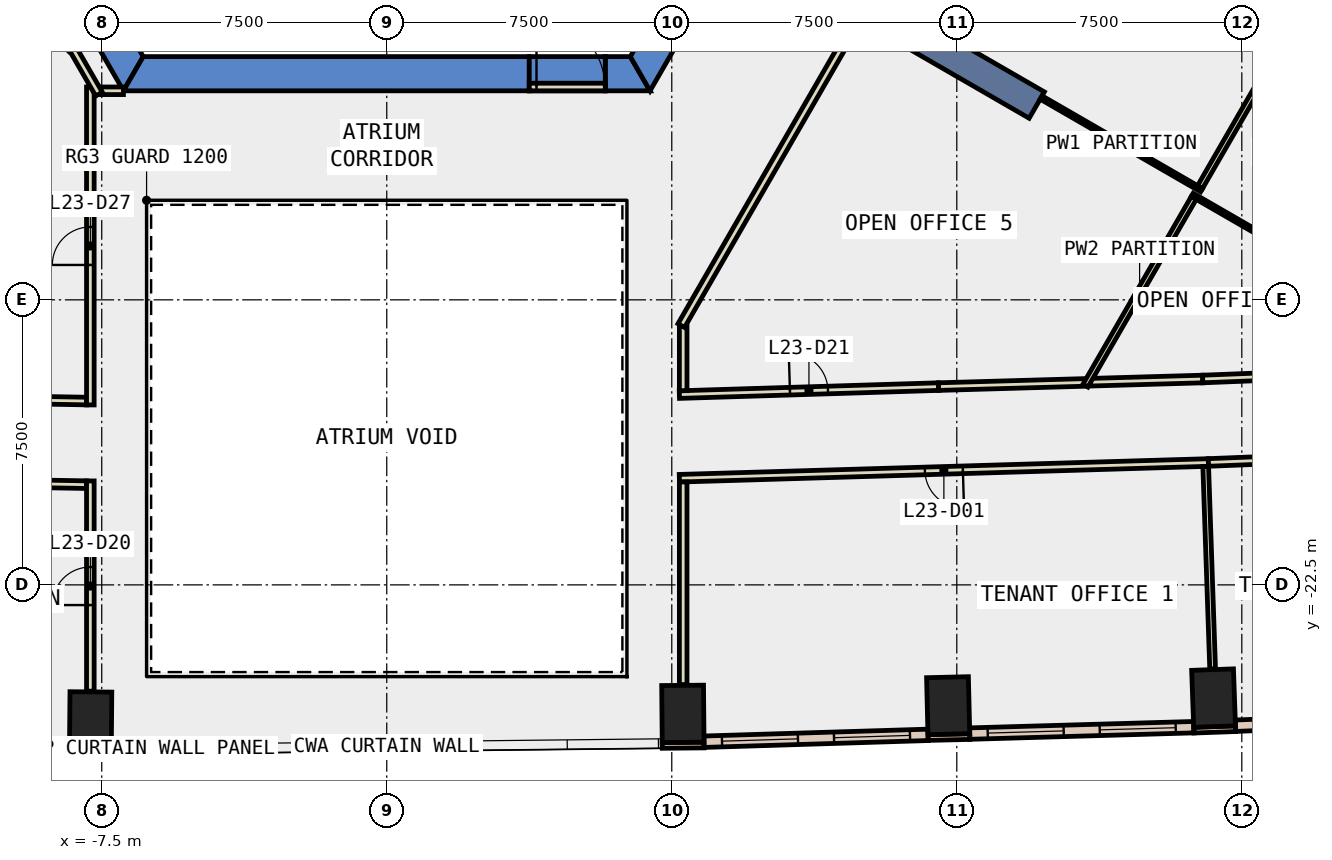
"""IFC4 building model, lengths in metres.
Left out: names, types, materials, properties, quantities, classifications, styles, units other than length and angle.
Written with IfcOpenShell. Run it as: python <this file> out.ifc"""

import sys

from ifc_helpers import new_model, si_unit, direction, frame, frame_2d, origin, origin_2d, place, context, subcontext, project, spatial, polyline, rectangle, outline, extrude, element, fill, save


model = new_model("IFC4")
c1 = context("Model", 3, precision=1e-05, world=origin(), true_north=direction((0.0, 1.0)))
c2 = subcontext(c1, "Body", "Model", "MODEL_VIEW")
j1 = project(units=[si_unit("LENGTHUNIT", "METRE"), si_unit("PLANEANGLEUNIT", "RADIAN")], contexts=[c1])
p1 = place(None, origin())
s1 = spatial("IfcSite", under=j1, at=p1, CompositionType="ELEMENT")
p2 = place(p1, origin())
s2 = spatial("IfcBuilding", under=s1, at=p2, CompositionType="ELEMENT")
p3 = place(p2, frame((0.0, 0.0, 107.6)))
s3 = spatial("IfcBuildingStorey", under=s2, at=p3, CompositionType="ELEMENT", Elevation=107.6)
for number, where, z_axis, x_axis in (
    (1, (-7.792, -26.066, -0.4), (0.0, 0.0, 1.0), (-1.0, 0.009, 0.0)),
    (2, (7.792, -25.894, -0.4), (0.0, 0.0, 1.0), (1.0, 0.009, 0.0)),
    (3, (14.773, -25.679, -0.4), (0.0, 0.0, 1.0), (1.0, 0.024, 0.0)),
    (4, (21.757, -25.479, -0.4), (0.0, 0.0, 1.0), (0.999, 0.035, 0.0)),
):
    element("IfcColumn", number, at=place(p3, frame(where, z_axis=z_axis, x_axis=x_axis)), inside=s3, PredefinedType="COLUMN", context=c2, shape_type="SweptSolid", body=[
        extrude(rectangle(XDim=1.1, YDim=1.5, at=origin_2d()), origin(), (0.0, 0.0, 1.0), 4.2),
    ])
p4 = place(p3, frame((0.0, 0.0, -0.4)))
e5 = element("IfcWall", 5, at=p4, inside=s3, PredefinedType="SHEAR", context=c2, shape_type="SweptSolid", body=[
    extrude(outline(polyline([(-13.856, 2.5), (-6.928, -9.5), (-6.409, -8.6), (-12.817, 2.5), (-13.856, 2.5)])), origin(), (0.0, 0.0, 1.0), 4.2),
])
p5 = place(p3, frame((0.0, 0.0, -0.4)))
e6 = element("IfcWall", 6, at=p5, inside=s3, PredefinedType="SHEAR", context=c2, shape_type="SweptSolid", body=[
    extrude(outline(polyline([(3.75, -9.5), (3.75, -8.6), (-6.409, -8.6), (-6.928, -9.5), (3.75, -9.5)])), origin(), (0.0, 0.0, 1.0), 4.2),
])
p6 = place(p3, frame((0.0, 0.0, -0.4)))
e7 = element("IfcWall", 7, at=p6, inside=s3, PredefinedType="SHEAR", context=c2, shape_type="SweptSolid", body=[
    extrude(outline(polyline([(5.75, -8.6), (5.75, -9.5), (6.928, -9.5), (6.409, -8.6), (5.75, -8.6)])), origin(), (0.0, 0.0, 1.0), 4.2),
])
p7 = place(p3, frame((0.0, 0.0, 3.6)))
e8 = element("IfcWall", 8, at=p7, inside=s3, PredefinedType="SHEAR", context=c2, shape_type="SweptSolid", body=[
    extrude(outline(polyline([(5.75, -9.5), (5.75, -8.6), (3.75, -8.6), (3.75, -9.5), (5.75, -9.5)])), origin(), (0.0, 0.0, 1.0), 0.2),
])
p8 = place(p3, frame((0.0, 0.0, -0.4)))
e9 = element("IfcWall", 9, at=p8, inside=s3, PredefinedType="SHEAR", context=c2, shape_type="SweptSolid", body=[
    extrude(outline(polyline([(8.117, -7.44), (7.338, -6.99), (6.409, -8.6), (6.928, -9.5), (8.117, -7.44)])), origin(), (0.0, 0.0, 1.0), 4.2),
])
p9 = place(p3, frame((9.31, -5.375, -0.4), z_axis=(0.0, 0.0, 1.0), x_axis=(0.866017533419, -0.500013631625, 0.0)))
e10 = element("IfcWall", 10, at=p9, inside=s3, PredefinedType="SHEAR", context=c2, shape_type="SweptSolid", body=[
    extrude(rectangle(XDim=9.0, YDim=0.8, at=frame_2d((4.5, 0.0))), origin(), (0.0, 0.0, 1.0), 4.2),
])
for number, where, z_axis, x_axis in (
    (11, (-8.349, -26.886, 0.0), (0.0, 0.0, 1.0), (1.0, -0.009, 0.0)),
    (12, (7.249, -26.724, 0.0), (0.0, 0.0, 1.0), (1.0, 0.009, 0.0)),
):
    element("IfcWall", number, at=place(p3, frame(where, z_axis=z_axis, x_axis=x_axis)), inside=s3, PredefinedType="STANDARD", context=c2, shape_type="SweptSolid", body=[
        extrude(rectangle(XDim=1.1, YDim=0.15, at=frame_2d((0.55, 0.0))), origin(), (0.0, 0.0, 1.0), 3.8),
    ])
p10 = place(p3, frame((14.243, -26.517, 0.0), z_axis=(0.0, 0.0, 1.0), x_axis=(0.999718180159, 0.023739424163, 0.0)))
e13 = element("IfcWall", 13, at=p10, inside=s3, PredefinedType="STANDARD", context=c2, shape_type="SweptSolid", body=[
    extrude(rectangle(XDim=1.1, YDim=0.15, at=frame_2d((0.55, 0.0))), origin(), (0.0, 0.0, 1.0), 3.8),
])
p11 = place(p3, frame((21.237, -26.323, 0.0), z_axis=(0.0, 0.0, 1.0), x_axis=(0.999368780235, 0.035525217693, 0.0)))
e14 = element("IfcWall", 14, at=p11, inside=s3, PredefinedType="STANDARD", context=c2, shape_type="SweptSolid", body=[
    extrude(rectangle(XDim=1.1, YDim=0.15, at=frame_2d((0.55, 0.0))), origin(), (0.0, 0.0, 1.0), 3.8),
])
p12 = place(p3, frame((-14.242, -26.703, 0.0), z_axis=(0.0, 0.0, 1.0), x_axis=(0.999847261365, -0.017477240672, 0.0)))
e15 = element("IfcWall", 15, at=p12, inside=s3, PredefinedType="STANDARD", context=c2, shape_type="SweptSolid", body=[
    extrude(rectangle(XDim=5.895, YDim=0.3, at=frame_2d((2.948, 0.0))), origin(), (0.0, 0.0, 1.0), 3.8),
])
p13 = place(p12, frame((0.474, 0.0, 0.9)))
e16 = element("IfcOpeningElement", 16, at=p13, cuts=e15, PredefinedType="OPENING", context=c2, shape_type="SweptSolid", body=[
    extrude(rectangle(XDim=2.0, YDim=2.6, at=frame_2d((1.0, 1.3))), frame((0.0, 0.16, 0.0), z_axis=(0.0, -1.0, 0.0), x_axis=(1.0, 0.0, 0.0)), (0.0, 0.0, 1.0), 0.32),
])
p14 = place(p12, frame((3.421, 0.0, 0.9)))
e17 = element("IfcOpeningElement", 17, at=p14, cuts=e15, PredefinedType="OPENING", context=c2, shape_type="SweptSolid", body=[
    extrude(rectangle(XDim=2.0, YDim=2.6, at=frame_2d((1.0, 1.3))), frame((0.0, 0.16, 0.0), z_axis=(0.0, -1.0, 0.0), x_axis=(1.0, 0.0, 0.0)), (0.0, 0.0, 1.0), 0.32),
])
p15 = place(p3, frame((8.347, -26.627, 0.0), z_axis=(0.0, 0.0, 1.0), x_axis=(0.999529601824, 0.030668796478, 0.0)))
e18 = element("IfcWall", 18, at=p15, inside=s3, PredefinedType="STANDARD", context=c2, shape_type="SweptSolid", body=[
    extrude(rectangle(XDim=5.899, YDim=0.3, at=frame_2d((2.949, 0.0))), origin(), (0.0, 0.0, 1.0), 3.8),
])
p16 = place(p15, frame((0.475, 0.0, 0.9)))
e19 = element("IfcOpeningElement", 19, at=p16, cuts=e18, PredefinedType="OPENING", context=c2, shape_type="SweptSolid", body=[
    extrude(rectangle(XDim=2.0, YDim=2.6, at=frame_2d((1.0, 1.3))), frame((0.0, 0.16, 0.0), z_axis=(0.0, -1.0, 0.0), x_axis=(1.0, 0.0, 0.0)), (0.0, 0.0, 1.0), 0.32),
])
p17 = place(p15, frame((3.424, 0.0, 0.9)))
e20 = element("IfcOpeningElement", 20, at=p17, cuts=e18, PredefinedType="OPENING", context=c2, shape_type="SweptSolid", body=[
    extrude(rectangle(XDim=2.0, YDim=2.6, at=frame_2d((1.0, 1.3))), frame((0.0, 0.16, 0.0), z_axis=(0.0, -1.0, 0.0), x_axis=(1.0, 0.0, 0.0)), (0.0, 0.0, 1.0), 0.32),
])
p18 = place(p3, frame((15.34, -26.413, 0.0), z_axis=(0.0, 0.0, 1.0), x_axis=(0.999588397616, 0.028688592709, 0.0)))
e21 = element("IfcWall", 21, at=p18, inside=s3, PredefinedType="STANDARD", context=c2, shape_type="SweptSolid", body=[
    extrude(rectangle(XDim=5.897, YDim=0.3, at=frame_2d((2.949, 0.0))), origin(), (0.0, 0.0, 1.0), 3.8),
])
p19 = place(p18, frame((0.474, 0.0, 0.9)))
e22 = element("IfcOpeningElement", 22, at=p19, cuts=e21, PredefinedType="OPENING", context=c2, shape_type="SweptSolid", body=[
    extrude(rectangle(XDim=2.0, YDim=2.6, at=frame_2d((1.0, 1.3))), frame((0.0, 0.16, 0.0), z_axis=(0.0, -1.0, 0.0), x_axis=(1.0, 0.0, 0.0)), (0.0, 0.0, 1.0), 0.32),
])
p20 = place(p18, frame((3.423, 0.0, 0.9)))
e23 = element("IfcOpeningElement", 23, at=p20, cuts=e21, PredefinedType="OPENING", context=c2, shape_type="SweptSolid", body=[
    extrude(rectangle(XDim=2.0, YDim=2.6, at=frame_2d((1.0, 1.3))), frame((0.0, 0.16, 0.0), z_axis=(0.0, -1.0, 0.0), x_axis=(1.0, 0.0, 0.0)), (0.0, 0.0, 1.0), 0.32),
])
p21 = place(p3, frame((22.332, -26.206, 0.0), z_axis=(0.0, 0.0, 1.0), x_axis=(0.99922113396, 0.039460428885, 0.0)))
e24 = element("IfcWall", 24, at=p21, inside=s3, PredefinedType="STANDARD", context=c2, shape_type="SweptSolid", body=[
    extrude(rectangle(XDim=5.878, YDim=0.3, at=frame_2d((2.939, 0.0))), origin(), (0.0, 0.0, 1.0), 3.8),
])
p22 = place(p21, frame((0.469, 0.0, 0.9)))
e25 = element("IfcOpeningElement", 25, at=p22, cuts=e24, PredefinedType="OPENING", context=c2, shape_type="SweptSolid", body=[
    extrude(rectangle(XDim=2.0, YDim=2.6, at=frame_2d((1.0, 1.3))), frame((0.0, 0.16, 0.0), z_axis=(0.0, -1.0, 0.0), x_axis=(1.0, 0.0, 0.0)), (0.0, 0.0, 1.0), 0.32),
])
p23 = place(p21, frame((3.408, 0.0, 0.9)))
e26 = element("IfcOpeningElement", 26, at=p23, cuts=e24, PredefinedType="OPENING", context=c2, shape_type="SweptSolid", body=[
    extrude(rectangle(XDim=2.0, YDim=2.6, at=frame_2d((1.0, 1.3))), frame((0.0, 0.16, 0.0), z_axis=(0.0, -1.0, 0.0), x_axis=(1.0, 0.0, 0.0)), (0.0, 0.0, 1.0), 0.32),
])
p24 = place(p3, frame((7.7, -17.493, 0.0), z_axis=(0.0, 0.0, 1.0), x_axis=(0.999526319751, 0.030775576778, 0.0)))
e27 = element("IfcWall", 27, at=p24, inside=s3, PredefinedType="PARTITIONING", context=c2, shape_type="SweptSolid", body=[
    extrude(rectangle(XDim=6.822, YDim=0.2, at=frame_2d((3.411, 0.0))), origin(), (0.0, 0.0, 1.0), 3.8),
])
p25 = place(p24, frame((2.911, 0.0, 0.0)))
e28 = element("IfcOpeningElement", 28, at=p25, cuts=e27, PredefinedType="OPENING", context=c2, shape_type="SweptSolid", body=[
    extrude(rectangle(XDim=1.0, YDim=2.1, at=frame_2d((0.5, 1.05))), frame((0.0, 0.11, 0.0), z_axis=(0.0, -1.0, 0.0), x_axis=(1.0, 0.0, 0.0)), (0.0, 0.0, 1.0), 0.22),
])
p26 = place(p3, frame((14.519, -17.283, 0.0), z_axis=(0.0, 0.0, 1.0), x_axis=(0.999591204998, 0.028590608419, 0.0)))
e29 = element("IfcWall", 29, at=p26, inside=s3, PredefinedType="PARTITIONING", context=c2, shape_type="SweptSolid", body=[
    extrude(rectangle(XDim=3.843, YDim=0.2, at=frame_2d((1.921, 0.0))), origin(), (0.0, 0.0, 1.0), 3.8),
])
p27 = place(p3, frame((18.509, -17.168, 0.0), z_axis=(0.0, 0.0, 1.0), x_axis=(0.999588854267, 0.028672677323, 0.0)))
e30 = element("IfcWall", 30, at=p27, inside=s3, PredefinedType="PARTITIONING", context=c2, shape_type="SweptSolid", body=[
    extrude(rectangle(XDim=2.963, YDim=0.2, at=frame_2d((1.481, 0.0))), origin(), (0.0, 0.0, 1.0), 3.8),
])
p28 = place(p3, frame((21.471, -17.083, 0.0), z_axis=(0.0, 0.0, 1.0), x_axis=(0.999221407079, 0.039453512338, 0.0)))
e31 = element("IfcWall", 31, at=p28, inside=s3, PredefinedType="PARTITIONING", context=c2, shape_type="SweptSolid", body=[
    extrude(rectangle(XDim=6.083, YDim=0.2, at=frame_2d((3.042, 0.0))), origin(), (0.0, 0.0, 1.0), 3.8),
])
p29 = place(p28, frame((2.541, 0.0, 0.0)))
e32 = element("IfcOpeningElement", 32, at=p29, cuts=e31, PredefinedType="OPENING", context=c2, shape_type="SweptSolid", body=[
    extrude(rectangle(XDim=1.0, YDim=2.1, at=frame_2d((0.5, 1.05))), frame((0.0, 0.11, 0.0), z_axis=(0.0, -1.0, 0.0), x_axis=(1.0, 0.0, 0.0)), (0.0, 0.0, 1.0), 0.22),
])
p30 = place(p3, frame((-10.923, -17.61, 0.0), z_axis=(0.0, 0.0, 1.0), x_axis=(0.999846489632, -0.017521334753, 0.0)))
e33 = element("IfcWall", 33, at=p30, inside=s3, PredefinedType="PARTITIONING", context=c2, shape_type="SweptSolid", body=[
    extrude(rectangle(XDim=3.024, YDim=0.2, at=frame_2d((1.512, 0.0))), origin(), (0.0, 0.0, 1.0), 3.8),
])
p31 = place(p3, frame((21.621, -19.28, 0.0), z_axis=(0.0, 0.0, 1.0), x_axis=(-0.999557957525, -0.029730280001, 0.0)))
e34 = element("IfcWall", 34, at=p31, inside=s3, PredefinedType="PARTITIONING", context=c2, shape_type="SweptSolid", body=[
    extrude(rectangle(XDim=13.927, YDim=0.2, at=frame_2d((6.964, 0.0))), origin(), (0.0, 0.0, 1.0), 3.8),
])
p32 = place(p31, frame((6.464, 0.0, 0.0)))
e35 = element("IfcOpeningElement", 35, at=p32, cuts=e34, PredefinedType="OPENING", context=c2, shape_type="SweptSolid", body=[
    extrude(rectangle(XDim=1.0, YDim=2.1, at=frame_2d((0.5, 1.05))), frame((0.0, 0.11, 0.0), z_axis=(0.0, -1.0, 0.0), x_axis=(1.0, 0.0, 0.0)), (0.0, 0.0, 1.0), 0.22),
])
p33 = place(p3, frame((27.865, -19.032, 0.0), z_axis=(0.0, 0.0, 1.0), x_axis=(-0.999218029978, -0.039538950003, 0.0)))
e36 = element("IfcWall", 36, at=p33, inside=s3, PredefinedType="PARTITIONING", context=c2, shape_type="SweptSolid", body=[
    extrude(rectangle(XDim=6.249, YDim=0.2, at=frame_2d((3.125, 0.0))), origin(), (0.0, 0.0, 1.0), 3.8),
])
p34 = place(p33, frame((2.699, 0.0, 0.0)))
e37 = element("IfcOpeningElement", 37, at=p34, cuts=e36, PredefinedType="OPENING", context=c2, shape_type="SweptSolid", body=[
    extrude(rectangle(XDim=1.0, YDim=2.1, at=frame_2d((0.5, 1.05))), frame((0.0, 0.11, 0.0), z_axis=(0.0, -1.0, 0.0), x_axis=(1.0, 0.0, 0.0)), (0.0, 0.0, 1.0), 0.22),
])
p35 = place(p3, frame((-7.9, -19.863, 0.0), z_axis=(0.0, 0.0, 1.0), x_axis=(-0.999845883554, 0.017555886191, 0.0)))
e38 = element("IfcWall", 38, at=p35, inside=s3, PredefinedType="PARTITIONING", context=c2, shape_type="SweptSolid", body=[
    extrude(rectangle(XDim=3.198, YDim=0.2, at=frame_2d((1.599, 0.0))), origin(), (0.0, 0.0, 1.0), 3.8),
])
p36 = place(p3, frame((7.8, -15.69, 0.0), z_axis=(0.0, 0.0, 1.0), x_axis=(0.0, -1.0, 0.0)))
e39 = element("IfcWall", 39, at=p36, inside=s3, PredefinedType="PARTITIONING", context=c2, shape_type="SweptSolid", body=[
    extrude(rectangle(XDim=1.7, YDim=0.2, at=frame_2d((0.85, 0.0))), origin(), (0.0, 0.0, 1.0), 3.8),
])
p37 = place(p3, frame((-7.522, -9.499, 0.0), z_axis=(0.0, 0.0, 1.0), x_axis=(1.0, 0.0, 0.0)))
e40 = element("IfcWall", 40, at=p37, inside=s3, PredefinedType="PARTITIONING", context=c2, shape_type="SweptSolid", body=[
    extrude(rectangle(XDim=0.593, YDim=0.2, at=frame_2d((0.296, 0.0))), origin(), (0.0, 0.0, 1.0), 3.8),
])
p38 = place(p3, frame((-7.8, -17.765, 0.0), z_axis=(0.0, 0.0, 1.0), x_axis=(0.0, 1.0, 0.0)))
e41 = element("IfcWall", 41, at=p38, inside=s3, PredefinedType="PARTITIONING", context=c2, shape_type="SweptSolid", body=[
    extrude(rectangle(XDim=8.366, YDim=0.2, at=frame_2d((4.183, 0.0))), origin(), (0.0, 0.0, 1.0), 3.8),
])
p39 = place(p38, frame((3.683, 0.0, 0.0)))
e42 = element("IfcOpeningElement", 42, at=p39, cuts=e41, PredefinedType="OPENING", context=c2, shape_type="SweptSolid", body=[
    extrude(rectangle(XDim=1.0, YDim=2.1, at=frame_2d((0.5, 1.05))), frame((0.0, 0.11, 0.0), z_axis=(0.0, -1.0, 0.0), x_axis=(1.0, 0.0, 0.0)), (0.0, 0.0, 1.0), 0.22),
])
p40 = place(p3, frame((7.8, -19.791, 0.0), z_axis=(0.0, 0.0, 1.0), x_axis=(0.0, -1.0, 0.0)))
e43 = element("IfcWall", 43, at=p40, inside=s3, PredefinedType="PARTITIONING", context=c2, shape_type="SweptSolid", body=[
    extrude(rectangle(XDim=5.333, YDim=0.2, at=frame_2d((2.667, 0.0))), origin(), (0.0, 0.0, 1.0), 3.8),
])
p41 = place(p3, frame((-7.8, -25.296, 0.0), z_axis=(0.0, 0.0, 1.0), x_axis=(0.0, 1.0, 0.0)))
e44 = element("IfcWall", 44, at=p41, inside=s3, PredefinedType="PARTITIONING", context=c2, shape_type="SweptSolid", body=[
    extrude(rectangle(XDim=5.531, YDim=0.2, at=frame_2d((2.766, 0.0))), origin(), (0.0, 0.0, 1.0), 3.8),
])
p42 = place(p41, frame((2.265, 0.0, 0.0)))
e45 = element("IfcOpeningElement", 45, at=p42, cuts=e44, PredefinedType="OPENING", context=c2, shape_type="SweptSolid", body=[
    extrude(rectangle(XDim=1.0, YDim=2.1, at=frame_2d((0.5, 1.05))), frame((0.0, 0.11, 0.0), z_axis=(0.0, -1.0, 0.0), x_axis=(1.0, 0.0, 0.0)), (0.0, 0.0, 1.0), 0.22),
])
p43 = place(p3, frame((12.401, -7.621, 0.0), z_axis=(0.0, 0.0, 1.0), x_axis=(-0.499983724212, -0.866034800411, 0.0)))
e46 = element("IfcWall", 46, at=p43, inside=s3, PredefinedType="PARTITIONING", context=c2, shape_type="SweptSolid", body=[
    extrude(rectangle(XDim=9.302, YDim=0.2, at=frame_2d((4.651, 0.0))), origin(), (0.0, 0.0, 1.0), 3.8),
])
p44 = place(p3, frame((17.219, -9.676, 0.0), z_axis=(0.0, 0.0, 1.0), x_axis=(0.86598459596, -0.500070674565, 0.0)))
e47 = element("IfcWall", 47, at=p44, inside=s3, PredefinedType="PARTITIONING", context=c2, shape_type="SweptSolid", body=[
    extrude(rectangle(XDim=4.875, YDim=0.1, at=frame_2d((2.438, 0.0))), origin(), (0.0, 0.0, 1.0), 3.8),
])
p45 = place(p3, frame((21.236, -12.319, 0.0), z_axis=(0.0, 0.0, 1.0), x_axis=(-0.500016488359, -0.866015884017, 0.0)))
e48 = element("IfcWall", 48, at=p45, inside=s3, PredefinedType="PARTITIONING", context=c2, shape_type="SweptSolid", body=[
    extrude(rectangle(XDim=5.702, YDim=0.15, at=frame_2d((2.851, 0.0))), origin(), (0.0, 0.0, 1.0), 3.8),
])
p46 = place(p3, frame((24.137, -7.294, 0.0), z_axis=(0.0, 0.0, 1.0), x_axis=(-0.500001804394, -0.866024362014, 0.0)))
e49 = element("IfcWall", 49, at=p46, inside=s3, PredefinedType="PARTITIONING", context=c2, shape_type="SweptSolid", body=[
    extrude(rectangle(XDim=5.472, YDim=0.15, at=frame_2d((2.736, 0.0))), origin(), (0.0, 0.0, 1.0), 3.8),
])
p47 = place(p3, frame((21.196, -12.238, 0.0), z_axis=(0.0, 0.0, 1.0), x_axis=(0.866023145199, -0.500003911965, 0.0)))
e50 = element("IfcWall", 50, at=p47, inside=s3, PredefinedType="PARTITIONING", context=c2, shape_type="SweptSolid", body=[
    extrude(rectangle(XDim=8.71, YDim=0.1, at=frame_2d((4.355, 0.0))), origin(), (0.0, 0.0, 1.0), 3.8),
])
p48 = place(p3, frame((-7.572, -9.586, 0.0), z_axis=(0.0, 0.0, 1.0), x_axis=(-0.499484152563, 0.866323023669, 0.0)))
e51 = element("IfcWall", 51, at=p48, inside=s3, PredefinedType="PARTITIONING", context=c2, shape_type="SweptSolid", body=[
    extrude(rectangle(XDim=1.39, YDim=0.2, at=frame_2d((0.695, 0.0))), origin(), (0.0, 0.0, 1.0), 3.8),
])
p49 = place(p3, frame((21.55, -19.382, 0.0), z_axis=(0.0, 0.0, 1.0), x_axis=(0.034124666577, -0.999417583961, 0.0)))
e52 = element("IfcWall", 52, at=p49, inside=s3, PredefinedType="PARTITIONING", context=c2, shape_type="SweptSolid", body=[
    extrude(rectangle(XDim=5.33, YDim=0.15, at=frame_2d((2.665, 0.0))), origin(), (0.0, 0.0, 1.0), 3.8),
])
p50 = place(p3, frame((3.75, -9.4, 0.0), z_axis=(0.0, 0.0, 1.0), x_axis=(1.0, 0.0, 0.0)))
e53 = element("IfcWall", 53, at=p50, inside=s3, PredefinedType="PARTITIONING", context=c2, shape_type="SweptSolid", body=[
    extrude(rectangle(XDim=2.0, YDim=0.2, at=frame_2d((1.0, 0.0))), origin(), (0.0, 0.0, 1.0), 2.4),
])
p51 = place(p50, frame((0.19, 0.0, 0.0)))
e54 = element("IfcOpeningElement", 54, at=p51, cuts=e53, PredefinedType="OPENING", context=c2, shape_type="SweptSolid", body=[
    extrude(rectangle(XDim=1.8, YDim=2.1, at=frame_2d((0.9, 1.05))), frame((0.0, 0.11, 0.0), z_axis=(0.0, -1.0, 0.0), x_axis=(1.0, 0.0, 0.0)), (0.0, 0.0, 1.0), 0.22),
])
p52 = place(p16, origin())
e55 = element("IfcWindow", 55, at=p52, inside=s3, PartitioningType="SINGLE_PANEL", PredefinedType="WINDOW", context=c2, shape_type="SweptSolid", body=[
    extrude(rectangle(XDim=2.0, YDim=2.6, at=frame_2d((1.0, 1.3))), frame((0.0, 0.03, 0.0), z_axis=(0.0, -1.0, 0.0), x_axis=(1.0, 0.0, 0.0)), (0.0, 0.0, 1.0), 0.06),
])
fill(e19, e55)
p53 = place(p17, origin())
e56 = element("IfcWindow", 56, at=p53, inside=s3, PartitioningType="SINGLE_PANEL", PredefinedType="WINDOW", context=c2, shape_type="SweptSolid", body=[
    extrude(rectangle(XDim=2.0, YDim=2.6, at=frame_2d((1.0, 1.3))), frame((0.0, 0.03, 0.0), z_axis=(0.0, -1.0, 0.0), x_axis=(1.0, 0.0, 0.0)), (0.0, 0.0, 1.0), 0.06),
])
fill(e20, e56)
p54 = place(p19, origin())
e57 = element("IfcWindow", 57, at=p54, inside=s3, PartitioningType="SINGLE_PANEL", PredefinedType="WINDOW", context=c2, shape_type="SweptSolid", body=[
    extrude(rectangle(XDim=2.0, YDim=2.6, at=frame_2d((1.0, 1.3))), frame((0.0, 0.03, 0.0), z_axis=(0.0, -1.0, 0.0), x_axis=(1.0, 0.0, 0.0)), (0.0, 0.0, 1.0), 0.06),
])
fill(e22, e57)
p55 = place(p20, origin())
e58 = element("IfcWindow", 58, at=p55, inside=s3, PartitioningType="SINGLE_PANEL", PredefinedType="WINDOW", context=c2, shape_type="SweptSolid", body=[
    extrude(rectangle(XDim=2.0, YDim=2.6, at=frame_2d((1.0, 1.3))), frame((0.0, 0.03, 0.0), z_axis=(0.0, -1.0, 0.0), x_axis=(1.0, 0.0, 0.0)), (0.0, 0.0, 1.0), 0.06),
])
fill(e23, e58)
p56 = place(p32, origin())
e59 = element("IfcDoor", 59, at=p56, inside=s3, OperationType="SINGLE_SWING_LEFT", PredefinedType="DOOR", context=c2, shape_type="SweptSolid", body=[
    extrude(rectangle(XDim=1.0, YDim=2.1, at=frame_2d((0.5, 1.05))), frame((0.0, 0.025, 0.0), z_axis=(0.0, -1.0, 0.0), x_axis=(1.0, 0.0, 0.0)), (0.0, 0.0, 1.0), 0.05),
])
fill(e35, e59)
p57 = place(p42, origin())
e60 = element("IfcDoor", 60, at=p57, inside=s3, OperationType="SINGLE_SWING_LEFT", PredefinedType="DOOR", context=c2, shape_type="SweptSolid", body=[
    extrude(rectangle(XDim=1.0, YDim=2.1, at=frame_2d((0.5, 1.05))), frame((0.0, 0.025, 0.0), z_axis=(0.0, -1.0, 0.0), x_axis=(1.0, 0.0, 0.0)), (0.0, 0.0, 1.0), 0.05),
])
fill(e45, e60)
p58 = place(p25, origin())
e61 = element("IfcDoor", 61, at=p58, inside=s3, OperationType="SINGLE_SWING_LEFT", PredefinedType="DOOR", context=c2, shape_type="SweptSolid", body=[
    extrude(rectangle(XDim=1.0, YDim=2.1, at=frame_2d((0.5, 1.05))), frame((0.0, 0.025, 0.0), z_axis=(0.0, -1.0, 0.0), x_axis=(1.0, 0.0, 0.0)), (0.0, 0.0, 1.0), 0.05),
])
fill(e28, e61)
p59 = place(p39, origin())
e62 = element("IfcDoor", 62, at=p59, inside=s3, OperationType="SINGLE_SWING_RIGHT", PredefinedType="DOOR", context=c2, shape_type="SweptSolid", body=[
    extrude(rectangle(XDim=1.0, YDim=2.1, at=frame_2d((0.5, 1.05))), frame((0.0, 0.025, 0.0), z_axis=(0.0, -1.0, 0.0), x_axis=(1.0, 0.0, 0.0)), (0.0, 0.0, 1.0), 0.05),
])
fill(e42, e62)
p60 = place(p51, origin())
e63 = element("IfcDoor", 63, at=p60, inside=s3, OperationType="DOUBLE_DOOR_SINGLE_SWING", PredefinedType="DOOR", context=c2, shape_type="SweptSolid", body=[
    extrude(rectangle(XDim=1.8, YDim=2.1, at=frame_2d((0.9, 1.05))), frame((0.0, 0.025, 0.0), z_axis=(0.0, -1.0, 0.0), x_axis=(1.0, 0.0, 0.0)), (0.0, 0.0, 1.0), 0.05),
])
fill(e54, e63)
save(model, sys.argv[1])
